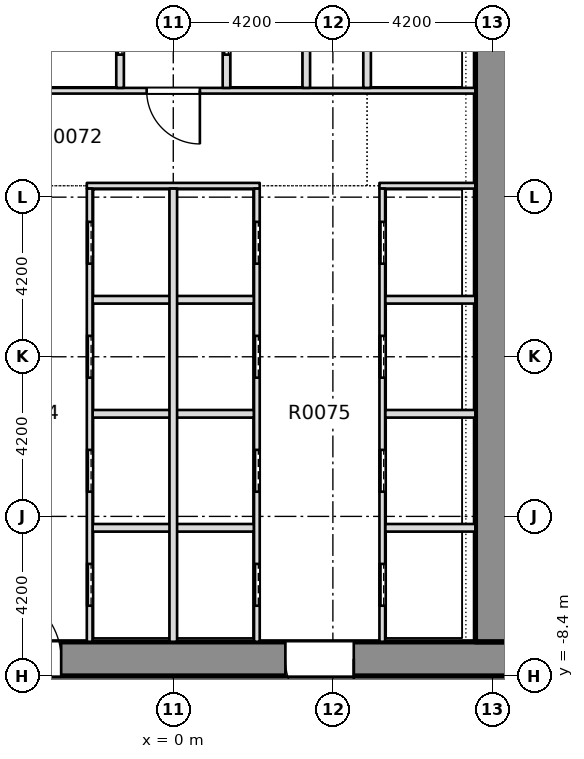
"""IFC4 building model, lengths in metres.
Left out: names, types, materials, properties, quantities, classifications, styles, units other than length and angle.
Written with IfcOpenShell. Run it as: python <this file> out.ifc"""

import sys

from ifc_helpers import new_model, si_unit, direction, frame, frame_2d, origin, place, context, subcontext, project, spatial, rectangle, extrude, element, fill, save


model = new_model("IFC4")
c1 = context("Model", 3, precision=1e-05, world=origin(), true_north=direction((0.0, 1.0)))
c2 = subcontext(c1, "Body", "Model", "MODEL_VIEW")
j1 = project(units=[si_unit("LENGTHUNIT", "METRE"), si_unit("PLANEANGLEUNIT", "RADIAN")], contexts=[c1])
p1 = place(None, origin())
s1 = spatial("IfcSite", under=j1, at=p1, CompositionType="ELEMENT")
p2 = place(p1, origin())
s2 = spatial("IfcBuilding", under=s1, at=p2, CompositionType="ELEMENT")
p3 = place(p2, origin())
s3 = spatial("IfcBuildingStorey", under=s2, at=p3, CompositionType="ELEMENT", Elevation=0.0)
p4 = place(p3, frame((-11.7, -7.95, -0.45), z_axis=(0.0, 0.0, 1.0), x_axis=(1.0, 0.0, 0.0)))
e1 = element("IfcWall", 1, at=p4, inside=s3, PredefinedType="SHEAR", context=c2, shape_type="SweptSolid", body=[
    extrude(rectangle(XDim=23.4, YDim=0.9, at=frame_2d((11.7, 0.0))), origin(), (0.0, 0.0, 1.0), 7.55),
])
p5 = place(p4, frame((6.95, 0.0, 0.45)))
e2 = element("IfcOpeningElement", 2, at=p5, cuts=e1, PredefinedType="OPENING", context=c2, shape_type="SweptSolid", body=[
    extrude(rectangle(XDim=1.8, YDim=2.1, at=frame_2d((0.9, 1.05))), frame((0.0, 0.46, 0.0), z_axis=(0.0, -1.0, 0.0), x_axis=(1.0, 0.0, 0.0)), (0.0, 0.0, 1.0), 0.92),
])
p6 = place(p4, frame((14.65, 0.0, 0.45)))
e3 = element("IfcOpeningElement", 3, at=p6, cuts=e1, PredefinedType="OPENING", context=c2, shape_type="SweptSolid", body=[
    extrude(rectangle(XDim=1.8, YDim=2.1, at=frame_2d((0.9, 1.05))), frame((0.0, 0.46, 0.0), z_axis=(0.0, -1.0, 0.0), x_axis=(1.0, 0.0, 0.0)), (0.0, 0.0, 1.0), 0.92),
])
p7 = place(p3, frame((8.4, -7.5, -0.45), z_axis=(0.0, 0.0, 1.0), x_axis=(0.0, 1.0, 0.0)))
e4 = element("IfcWall", 4, at=p7, inside=s3, PredefinedType="SHEAR", context=c2, shape_type="SweptSolid", body=[
    extrude(rectangle(XDim=28.35, YDim=0.9, at=frame_2d((14.175, 0.0))), origin(), (0.0, 0.0, 1.0), 7.55),
])
p8 = place(p7, frame((18.4, 0.0, 0.45)))
e5 = element("IfcOpeningElement", 5, at=p8, cuts=e4, PredefinedType="OPENING", context=c2, shape_type="SweptSolid", body=[
    extrude(rectangle(XDim=1.2, YDim=2.1, at=frame_2d((0.6, 1.05))), frame((0.0, 0.46, 0.0), z_axis=(0.0, -1.0, 0.0), x_axis=(1.0, 0.0, 0.0)), (0.0, 0.0, 1.0), 0.92),
])
p9 = place(p3, frame((-2.125, -4.5, 0.0), z_axis=(0.0, 0.0, 1.0), x_axis=(1.0, 0.0, 0.0)))
e6 = element("IfcWall", 6, at=p9, inside=s3, PredefinedType="PARTITIONING", context=c2, shape_type="SweptSolid", body=[
    extrude(rectangle(XDim=4.25, YDim=0.2, at=frame_2d((2.125, 0.0))), origin(), (0.0, 0.0, 1.0), 7.1),
])
p10 = place(p3, frame((5.575, -4.5, 0.0), z_axis=(0.0, 0.0, 1.0), x_axis=(1.0, 0.0, 0.0)))
e7 = element("IfcWall", 7, at=p10, inside=s3, PredefinedType="PARTITIONING", context=c2, shape_type="SweptSolid", body=[
    extrude(rectangle(XDim=2.374, YDim=0.2, at=frame_2d((1.187, 0.0))), origin(), (0.0, 0.0, 1.0), 7.1),
])
p11 = place(p3, frame((-2.125, -1.5, 0.0), z_axis=(0.0, 0.0, 1.0), x_axis=(1.0, 0.0, 0.0)))
e8 = element("IfcWall", 8, at=p11, inside=s3, PredefinedType="PARTITIONING", context=c2, shape_type="SweptSolid", body=[
    extrude(rectangle(XDim=4.25, YDim=0.2, at=frame_2d((2.125, 0.0))), origin(), (0.0, 0.0, 1.0), 7.1),
])
p12 = place(p3, frame((5.575, -1.5, 0.0), z_axis=(0.0, 0.0, 1.0), x_axis=(1.0, 0.0, 0.0)))
e9 = element("IfcWall", 9, at=p12, inside=s3, PredefinedType="PARTITIONING", context=c2, shape_type="SweptSolid", body=[
    extrude(rectangle(XDim=2.374, YDim=0.2, at=frame_2d((1.187, 0.0))), origin(), (0.0, 0.0, 1.0), 7.1),
])
p13 = place(p3, frame((-2.125, 1.5, 0.0), z_axis=(0.0, 0.0, 1.0), x_axis=(1.0, 0.0, 0.0)))
e10 = element("IfcWall", 10, at=p13, inside=s3, PredefinedType="PARTITIONING", context=c2, shape_type="SweptSolid", body=[
    extrude(rectangle(XDim=4.25, YDim=0.2, at=frame_2d((2.125, 0.0))), origin(), (0.0, 0.0, 1.0), 7.1),
])
p14 = place(p3, frame((5.575, 1.5, 0.0), z_axis=(0.0, 0.0, 1.0), x_axis=(1.0, 0.0, 0.0)))
e11 = element("IfcWall", 11, at=p14, inside=s3, PredefinedType="PARTITIONING", context=c2, shape_type="SweptSolid", body=[
    extrude(rectangle(XDim=2.374, YDim=0.2, at=frame_2d((1.187, 0.0))), origin(), (0.0, 0.0, 1.0), 7.1),
])
p15 = place(p3, frame((-2.275, 4.5, 0.0), z_axis=(0.0, 0.0, 1.0), x_axis=(1.0, 0.0, 0.0)))
e12 = element("IfcWall", 12, at=p15, inside=s3, PredefinedType="PARTITIONING", context=c2, shape_type="SweptSolid", body=[
    extrude(rectangle(XDim=4.55, YDim=0.15, at=frame_2d((2.275, 0.0))), origin(), (0.0, 0.0, 1.0), 7.1),
])
p16 = place(p3, frame((5.425, 4.5, 0.0), z_axis=(0.0, 0.0, 1.0), x_axis=(1.0, 0.0, 0.0)))
e13 = element("IfcWall", 13, at=p16, inside=s3, PredefinedType="PARTITIONING", context=c2, shape_type="SweptSolid", body=[
    extrude(rectangle(XDim=2.524, YDim=0.15, at=frame_2d((1.262, 0.0))), origin(), (0.0, 0.0, 1.0), 7.1),
])
p17 = place(p3, frame((-7.949, 7.0, 0.0), z_axis=(0.0, 0.0, 1.0), x_axis=(1.0, 0.0, 0.0)))
e14 = element("IfcWall", 14, at=p17, inside=s3, PredefinedType="PARTITIONING", context=c2, shape_type="SweptSolid", body=[
    extrude(rectangle(XDim=15.898, YDim=0.15, at=frame_2d((7.949, 0.0))), origin(), (0.0, 0.0, 1.0), 7.1),
])
p18 = place(p17, frame((7.249, 0.0, 0.0)))
e15 = element("IfcOpeningElement", 15, at=p18, cuts=e14, PredefinedType="OPENING", context=c2, shape_type="SweptSolid", body=[
    extrude(rectangle(XDim=1.4, YDim=2.1, at=frame_2d((0.7, 1.05))), frame((0.0, 0.085, 0.0), z_axis=(0.0, -1.0, 0.0), x_axis=(1.0, 0.0, 0.0)), (0.0, 0.0, 1.0), 0.17),
])
p19 = place(p3, frame((-2.2, -7.499, 0.0), z_axis=(0.0, 0.0, 1.0), x_axis=(0.0, 1.0, 0.0)))
e16 = element("IfcWall", 16, at=p19, inside=s3, PredefinedType="PARTITIONING", context=c2, shape_type="SweptSolid", body=[
    extrude(rectangle(XDim=11.924, YDim=0.15, at=frame_2d((5.962, 0.0))), origin(), (0.0, 0.0, 1.0), 7.1),
])
p20 = place(p19, frame((0.949, 0.0, 0.0)))
e17 = element("IfcOpeningElement", 17, at=p20, cuts=e16, PredefinedType="OPENING", context=c2, shape_type="SweptSolid", body=[
    extrude(rectangle(XDim=1.1, YDim=2.1, at=frame_2d((0.55, 1.05))), frame((0.0, 0.085, 0.0), z_axis=(0.0, -1.0, 0.0), x_axis=(1.0, 0.0, 0.0)), (0.0, 0.0, 1.0), 0.17),
])
p21 = place(p19, frame((3.949, 0.0, 0.0)))
e18 = element("IfcOpeningElement", 18, at=p21, cuts=e16, PredefinedType="OPENING", context=c2, shape_type="SweptSolid", body=[
    extrude(rectangle(XDim=1.1, YDim=2.1, at=frame_2d((0.55, 1.05))), frame((0.0, 0.085, 0.0), z_axis=(0.0, -1.0, 0.0), x_axis=(1.0, 0.0, 0.0)), (0.0, 0.0, 1.0), 0.17),
])
p22 = place(p19, frame((6.949, 0.0, 0.0)))
e19 = element("IfcOpeningElement", 19, at=p22, cuts=e16, PredefinedType="OPENING", context=c2, shape_type="SweptSolid", body=[
    extrude(rectangle(XDim=1.1, YDim=2.1, at=frame_2d((0.55, 1.05))), frame((0.0, 0.085, 0.0), z_axis=(0.0, -1.0, 0.0), x_axis=(1.0, 0.0, 0.0)), (0.0, 0.0, 1.0), 0.17),
])
p23 = place(p19, frame((9.949, 0.0, 0.0)))
e20 = element("IfcOpeningElement", 20, at=p23, cuts=e16, PredefinedType="OPENING", context=c2, shape_type="SweptSolid", body=[
    extrude(rectangle(XDim=1.1, YDim=2.1, at=frame_2d((0.55, 1.05))), frame((0.0, 0.085, 0.0), z_axis=(0.0, -1.0, 0.0), x_axis=(1.0, 0.0, 0.0)), (0.0, 0.0, 1.0), 0.17),
])
p24 = place(p3, frame((-1.4, 7.075, 0.0), z_axis=(0.0, 0.0, 1.0), x_axis=(0.0, 1.0, 0.0)))
e21 = element("IfcWall", 21, at=p24, inside=s3, PredefinedType="PARTITIONING", context=c2, shape_type="SweptSolid", body=[
    extrude(rectangle(XDim=2.85, YDim=0.2, at=frame_2d((1.425, 0.0))), origin(), (0.0, 0.0, 1.0), 7.1),
])
p25 = place(p24, frame((0.875, 0.0, 0.0)))
e22 = element("IfcOpeningElement", 22, at=p25, cuts=e21, PredefinedType="OPENING", context=c2, shape_type="SweptSolid", body=[
    extrude(rectangle(XDim=1.1, YDim=2.1, at=frame_2d((0.55, 1.05))), frame((0.0, 0.11, 0.0), z_axis=(0.0, -1.0, 0.0), x_axis=(1.0, 0.0, 0.0)), (0.0, 0.0, 1.0), 0.22),
])
p26 = place(p3, frame((0.0, -7.499, 0.0), z_axis=(0.0, 0.0, 1.0), x_axis=(0.0, 1.0, 0.0)))
e23 = element("IfcWall", 23, at=p26, inside=s3, PredefinedType="PARTITIONING", context=c2, shape_type="SweptSolid", body=[
    extrude(rectangle(XDim=11.924, YDim=0.2, at=frame_2d((5.962, 0.0))), origin(), (0.0, 0.0, 1.0), 7.1),
])
p27 = place(p3, frame((1.4, 7.075, 0.0), z_axis=(0.0, 0.0, 1.0), x_axis=(0.0, 1.0, 0.0)))
e24 = element("IfcWall", 24, at=p27, inside=s3, PredefinedType="PARTITIONING", context=c2, shape_type="SweptSolid", body=[
    extrude(rectangle(XDim=2.85, YDim=0.2, at=frame_2d((1.425, 0.0))), origin(), (0.0, 0.0, 1.0), 7.1),
])
p28 = place(p27, frame((0.875, 0.0, 0.0)))
e25 = element("IfcOpeningElement", 25, at=p28, cuts=e24, PredefinedType="OPENING", context=c2, shape_type="SweptSolid", body=[
    extrude(rectangle(XDim=1.1, YDim=2.1, at=frame_2d((0.55, 1.05))), frame((0.0, 0.11, 0.0), z_axis=(0.0, -1.0, 0.0), x_axis=(1.0, 0.0, 0.0)), (0.0, 0.0, 1.0), 0.22),
])
p29 = place(p3, frame((2.2, -7.499, 0.0), z_axis=(0.0, 0.0, 1.0), x_axis=(0.0, 1.0, 0.0)))
e26 = element("IfcWall", 26, at=p29, inside=s3, PredefinedType="PARTITIONING", context=c2, shape_type="SweptSolid", body=[
    extrude(rectangle(XDim=11.924, YDim=0.15, at=frame_2d((5.962, 0.0))), origin(), (0.0, 0.0, 1.0), 7.1),
])
p30 = place(p29, frame((0.949, 0.0, 0.0)))
e27 = element("IfcOpeningElement", 27, at=p30, cuts=e26, PredefinedType="OPENING", context=c2, shape_type="SweptSolid", body=[
    extrude(rectangle(XDim=1.1, YDim=2.1, at=frame_2d((0.55, 1.05))), frame((0.0, 0.085, 0.0), z_axis=(0.0, -1.0, 0.0), x_axis=(1.0, 0.0, 0.0)), (0.0, 0.0, 1.0), 0.17),
])
p31 = place(p29, frame((3.949, 0.0, 0.0)))
e28 = element("IfcOpeningElement", 28, at=p31, cuts=e26, PredefinedType="OPENING", context=c2, shape_type="SweptSolid", body=[
    extrude(rectangle(XDim=1.1, YDim=2.1, at=frame_2d((0.55, 1.05))), frame((0.0, 0.085, 0.0), z_axis=(0.0, -1.0, 0.0), x_axis=(1.0, 0.0, 0.0)), (0.0, 0.0, 1.0), 0.17),
])
p32 = place(p29, frame((6.949, 0.0, 0.0)))
e29 = element("IfcOpeningElement", 29, at=p32, cuts=e26, PredefinedType="OPENING", context=c2, shape_type="SweptSolid", body=[
    extrude(rectangle(XDim=1.1, YDim=2.1, at=frame_2d((0.55, 1.05))), frame((0.0, 0.085, 0.0), z_axis=(0.0, -1.0, 0.0), x_axis=(1.0, 0.0, 0.0)), (0.0, 0.0, 1.0), 0.17),
])
p33 = place(p29, frame((9.949, 0.0, 0.0)))
e30 = element("IfcOpeningElement", 30, at=p33, cuts=e26, PredefinedType="OPENING", context=c2, shape_type="SweptSolid", body=[
    extrude(rectangle(XDim=1.1, YDim=2.1, at=frame_2d((0.55, 1.05))), frame((0.0, 0.085, 0.0), z_axis=(0.0, -1.0, 0.0), x_axis=(1.0, 0.0, 0.0)), (0.0, 0.0, 1.0), 0.17),
])
p34 = place(p3, frame((3.5, 7.075, 0.0), z_axis=(0.0, 0.0, 1.0), x_axis=(0.0, 1.0, 0.0)))
e31 = element("IfcWall", 31, at=p34, inside=s3, PredefinedType="PARTITIONING", context=c2, shape_type="SweptSolid", body=[
    extrude(rectangle(XDim=2.85, YDim=0.2, at=frame_2d((1.425, 0.0))), origin(), (0.0, 0.0, 1.0), 7.1),
])
p35 = place(p3, frame((5.1, 7.075, 0.0), z_axis=(0.0, 0.0, 1.0), x_axis=(0.0, 1.0, 0.0)))
e32 = element("IfcWall", 32, at=p35, inside=s3, PredefinedType="PARTITIONING", context=c2, shape_type="SweptSolid", body=[
    extrude(rectangle(XDim=2.725, YDim=0.2, at=frame_2d((1.363, 0.0))), origin(), (0.0, 0.0, 1.0), 7.1),
])
p36 = place(p3, frame((5.5, -7.499, 0.0), z_axis=(0.0, 0.0, 1.0), x_axis=(0.0, 1.0, 0.0)))
e33 = element("IfcWall", 33, at=p36, inside=s3, PredefinedType="PARTITIONING", context=c2, shape_type="SweptSolid", body=[
    extrude(rectangle(XDim=11.924, YDim=0.15, at=frame_2d((5.962, 0.0))), origin(), (0.0, 0.0, 1.0), 7.1),
])
p37 = place(p36, frame((0.949, 0.0, 0.0)))
e34 = element("IfcOpeningElement", 34, at=p37, cuts=e33, PredefinedType="OPENING", context=c2, shape_type="SweptSolid", body=[
    extrude(rectangle(XDim=1.1, YDim=2.1, at=frame_2d((0.55, 1.05))), frame((0.0, 0.085, 0.0), z_axis=(0.0, -1.0, 0.0), x_axis=(1.0, 0.0, 0.0)), (0.0, 0.0, 1.0), 0.17),
])
p38 = place(p36, frame((3.949, 0.0, 0.0)))
e35 = element("IfcOpeningElement", 35, at=p38, cuts=e33, PredefinedType="OPENING", context=c2, shape_type="SweptSolid", body=[
    extrude(rectangle(XDim=1.1, YDim=2.1, at=frame_2d((0.55, 1.05))), frame((0.0, 0.085, 0.0), z_axis=(0.0, -1.0, 0.0), x_axis=(1.0, 0.0, 0.0)), (0.0, 0.0, 1.0), 0.17),
])
p39 = place(p36, frame((6.949, 0.0, 0.0)))
e36 = element("IfcOpeningElement", 36, at=p39, cuts=e33, PredefinedType="OPENING", context=c2, shape_type="SweptSolid", body=[
    extrude(rectangle(XDim=1.1, YDim=2.1, at=frame_2d((0.55, 1.05))), frame((0.0, 0.085, 0.0), z_axis=(0.0, -1.0, 0.0), x_axis=(1.0, 0.0, 0.0)), (0.0, 0.0, 1.0), 0.17),
])
p40 = place(p36, frame((9.949, 0.0, 0.0)))
e37 = element("IfcOpeningElement", 37, at=p40, cuts=e33, PredefinedType="OPENING", context=c2, shape_type="SweptSolid", body=[
    extrude(rectangle(XDim=1.1, YDim=2.1, at=frame_2d((0.55, 1.05))), frame((0.0, 0.085, 0.0), z_axis=(0.0, -1.0, 0.0), x_axis=(1.0, 0.0, 0.0)), (0.0, 0.0, 1.0), 0.17),
])
p41 = place(p20, origin())
e38 = element("IfcDoor", 38, at=p41, inside=s3, OperationType="SLIDING_TO_RIGHT", PredefinedType="DOOR", context=c2, shape_type="SweptSolid", body=[
    extrude(rectangle(XDim=1.1, YDim=2.1, at=frame_2d((0.55, 1.05))), frame((0.0, 0.025, 0.0), z_axis=(0.0, -1.0, 0.0), x_axis=(1.0, 0.0, 0.0)), (0.0, 0.0, 1.0), 0.05),
])
fill(e17, e38)
p42 = place(p21, origin())
e39 = element("IfcDoor", 39, at=p42, inside=s3, OperationType="SLIDING_TO_RIGHT", PredefinedType="DOOR", context=c2, shape_type="SweptSolid", body=[
    extrude(rectangle(XDim=1.1, YDim=2.1, at=frame_2d((0.55, 1.05))), frame((0.0, 0.025, 0.0), z_axis=(0.0, -1.0, 0.0), x_axis=(1.0, 0.0, 0.0)), (0.0, 0.0, 1.0), 0.05),
])
fill(e18, e39)
p43 = place(p22, origin())
e40 = element("IfcDoor", 40, at=p43, inside=s3, OperationType="SLIDING_TO_RIGHT", PredefinedType="DOOR", context=c2, shape_type="SweptSolid", body=[
    extrude(rectangle(XDim=1.1, YDim=2.1, at=frame_2d((0.55, 1.05))), frame((0.0, 0.025, 0.0), z_axis=(0.0, -1.0, 0.0), x_axis=(1.0, 0.0, 0.0)), (0.0, 0.0, 1.0), 0.05),
])
fill(e19, e40)
p44 = place(p23, origin())
e41 = element("IfcDoor", 41, at=p44, inside=s3, OperationType="SLIDING_TO_RIGHT", PredefinedType="DOOR", context=c2, shape_type="SweptSolid", body=[
    extrude(rectangle(XDim=1.1, YDim=2.1, at=frame_2d((0.55, 1.05))), frame((0.0, 0.025, 0.0), z_axis=(0.0, -1.0, 0.0), x_axis=(1.0, 0.0, 0.0)), (0.0, 0.0, 1.0), 0.05),
])
fill(e20, e41)
p45 = place(p30, origin())
e42 = element("IfcDoor", 42, at=p45, inside=s3, OperationType="SLIDING_TO_RIGHT", PredefinedType="DOOR", context=c2, shape_type="SweptSolid", body=[
    extrude(rectangle(XDim=1.1, YDim=2.1, at=frame_2d((0.55, 1.05))), frame((0.0, 0.025, 0.0), z_axis=(0.0, -1.0, 0.0), x_axis=(1.0, 0.0, 0.0)), (0.0, 0.0, 1.0), 0.05),
])
fill(e27, e42)
p46 = place(p31, origin())
e43 = element("IfcDoor", 43, at=p46, inside=s3, OperationType="SLIDING_TO_RIGHT", PredefinedType="DOOR", context=c2, shape_type="SweptSolid", body=[
    extrude(rectangle(XDim=1.1, YDim=2.1, at=frame_2d((0.55, 1.05))), frame((0.0, 0.025, 0.0), z_axis=(0.0, -1.0, 0.0), x_axis=(1.0, 0.0, 0.0)), (0.0, 0.0, 1.0), 0.05),
])
fill(e28, e43)
p47 = place(p32, origin())
e44 = element("IfcDoor", 44, at=p47, inside=s3, OperationType="SLIDING_TO_RIGHT", PredefinedType="DOOR", context=c2, shape_type="SweptSolid", body=[
    extrude(rectangle(XDim=1.1, YDim=2.1, at=frame_2d((0.55, 1.05))), frame((0.0, 0.025, 0.0), z_axis=(0.0, -1.0, 0.0), x_axis=(1.0, 0.0, 0.0)), (0.0, 0.0, 1.0), 0.05),
])
fill(e29, e44)
p48 = place(p33, origin())
e45 = element("IfcDoor", 45, at=p48, inside=s3, OperationType="SLIDING_TO_RIGHT", PredefinedType="DOOR", context=c2, shape_type="SweptSolid", body=[
    extrude(rectangle(XDim=1.1, YDim=2.1, at=frame_2d((0.55, 1.05))), frame((0.0, 0.025, 0.0), z_axis=(0.0, -1.0, 0.0), x_axis=(1.0, 0.0, 0.0)), (0.0, 0.0, 1.0), 0.05),
])
fill(e30, e45)
p49 = place(p37, origin())
e46 = element("IfcDoor", 46, at=p49, inside=s3, OperationType="SLIDING_TO_RIGHT", PredefinedType="DOOR", context=c2, shape_type="SweptSolid", body=[
    extrude(rectangle(XDim=1.1, YDim=2.1, at=frame_2d((0.55, 1.05))), frame((0.0, 0.025, 0.0), z_axis=(0.0, -1.0, 0.0), x_axis=(1.0, 0.0, 0.0)), (0.0, 0.0, 1.0), 0.05),
])
fill(e34, e46)
p50 = place(p38, origin())
e47 = element("IfcDoor", 47, at=p50, inside=s3, OperationType="SLIDING_TO_RIGHT", PredefinedType="DOOR", context=c2, shape_type="SweptSolid", body=[
    extrude(rectangle(XDim=1.1, YDim=2.1, at=frame_2d((0.55, 1.05))), frame((0.0, 0.025, 0.0), z_axis=(0.0, -1.0, 0.0), x_axis=(1.0, 0.0, 0.0)), (0.0, 0.0, 1.0), 0.05),
])
fill(e35, e47)
p51 = place(p39, origin())
e48 = element("IfcDoor", 48, at=p51, inside=s3, OperationType="SLIDING_TO_RIGHT", PredefinedType="DOOR", context=c2, shape_type="SweptSolid", body=[
    extrude(rectangle(XDim=1.1, YDim=2.1, at=frame_2d((0.55, 1.05))), frame((0.0, 0.025, 0.0), z_axis=(0.0, -1.0, 0.0), x_axis=(1.0, 0.0, 0.0)), (0.0, 0.0, 1.0), 0.05),
])
fill(e36, e48)
p52 = place(p40, origin())
e49 = element("IfcDoor", 49, at=p52, inside=s3, OperationType="SLIDING_TO_RIGHT", PredefinedType="DOOR", context=c2, shape_type="SweptSolid", body=[
    extrude(rectangle(XDim=1.1, YDim=2.1, at=frame_2d((0.55, 1.05))), frame((0.0, 0.025, 0.0), z_axis=(0.0, -1.0, 0.0), x_axis=(1.0, 0.0, 0.0)), (0.0, 0.0, 1.0), 0.05),
])
fill(e37, e49)
p53 = place(p18, origin())
e50 = element("IfcDoor", 50, at=p53, inside=s3, OperationType="SINGLE_SWING_RIGHT", PredefinedType="DOOR", context=c2, shape_type="SweptSolid", body=[
    extrude(rectangle(XDim=1.4, YDim=2.1, at=frame_2d((0.7, 1.05))), frame((0.0, 0.025, 0.0), z_axis=(0.0, -1.0, 0.0), x_axis=(1.0, 0.0, 0.0)), (0.0, 0.0, 1.0), 0.05),
])
fill(e15, e50)
p54 = place(p25, origin())
e51 = element("IfcDoor", 51, at=p54, inside=s3, OperationType="SLIDING_TO_RIGHT", PredefinedType="DOOR", context=c2, shape_type="SweptSolid", body=[
    extrude(rectangle(XDim=1.1, YDim=2.1, at=frame_2d((0.55, 1.05))), frame((0.0, 0.025, 0.0), z_axis=(0.0, -1.0, 0.0), x_axis=(1.0, 0.0, 0.0)), (0.0, 0.0, 1.0), 0.05),
])
fill(e22, e51)
p55 = place(p28, origin())
e52 = element("IfcDoor", 52, at=p55, inside=s3, OperationType="SLIDING_TO_RIGHT", PredefinedType="DOOR", context=c2, shape_type="SweptSolid", body=[
    extrude(rectangle(XDim=1.1, YDim=2.1, at=frame_2d((0.55, 1.05))), frame((0.0, 0.025, 0.0), z_axis=(0.0, -1.0, 0.0), x_axis=(1.0, 0.0, 0.0)), (0.0, 0.0, 1.0), 0.05),
])
fill(e25, e52)
p56 = place(p5, origin())
e53 = element("IfcDoor", 53, at=p56, inside=s3, OperationType="SINGLE_SWING_LEFT", PredefinedType="DOOR", context=c2, shape_type="SweptSolid", body=[
    extrude(rectangle(XDim=1.8, YDim=2.1, at=frame_2d((0.9, 1.05))), frame((0.0, 0.025, 0.0), z_axis=(0.0, -1.0, 0.0), x_axis=(1.0, 0.0, 0.0)), (0.0, 0.0, 1.0), 0.05),
])
fill(e2, e53)
p57 = place(p6, origin())
e54 = element("IfcDoor", 54, at=p57, inside=s3, OperationType="SINGLE_SWING_LEFT", PredefinedType="DOOR", context=c2, shape_type="SweptSolid", body=[
    extrude(rectangle(XDim=1.8, YDim=2.1, at=frame_2d((0.9, 1.05))), frame((0.0, 0.025, 0.0), z_axis=(0.0, -1.0, 0.0), x_axis=(1.0, 0.0, 0.0)), (0.0, 0.0, 1.0), 0.05),
])
fill(e3, e54)
save(model, sys.argv[1])
